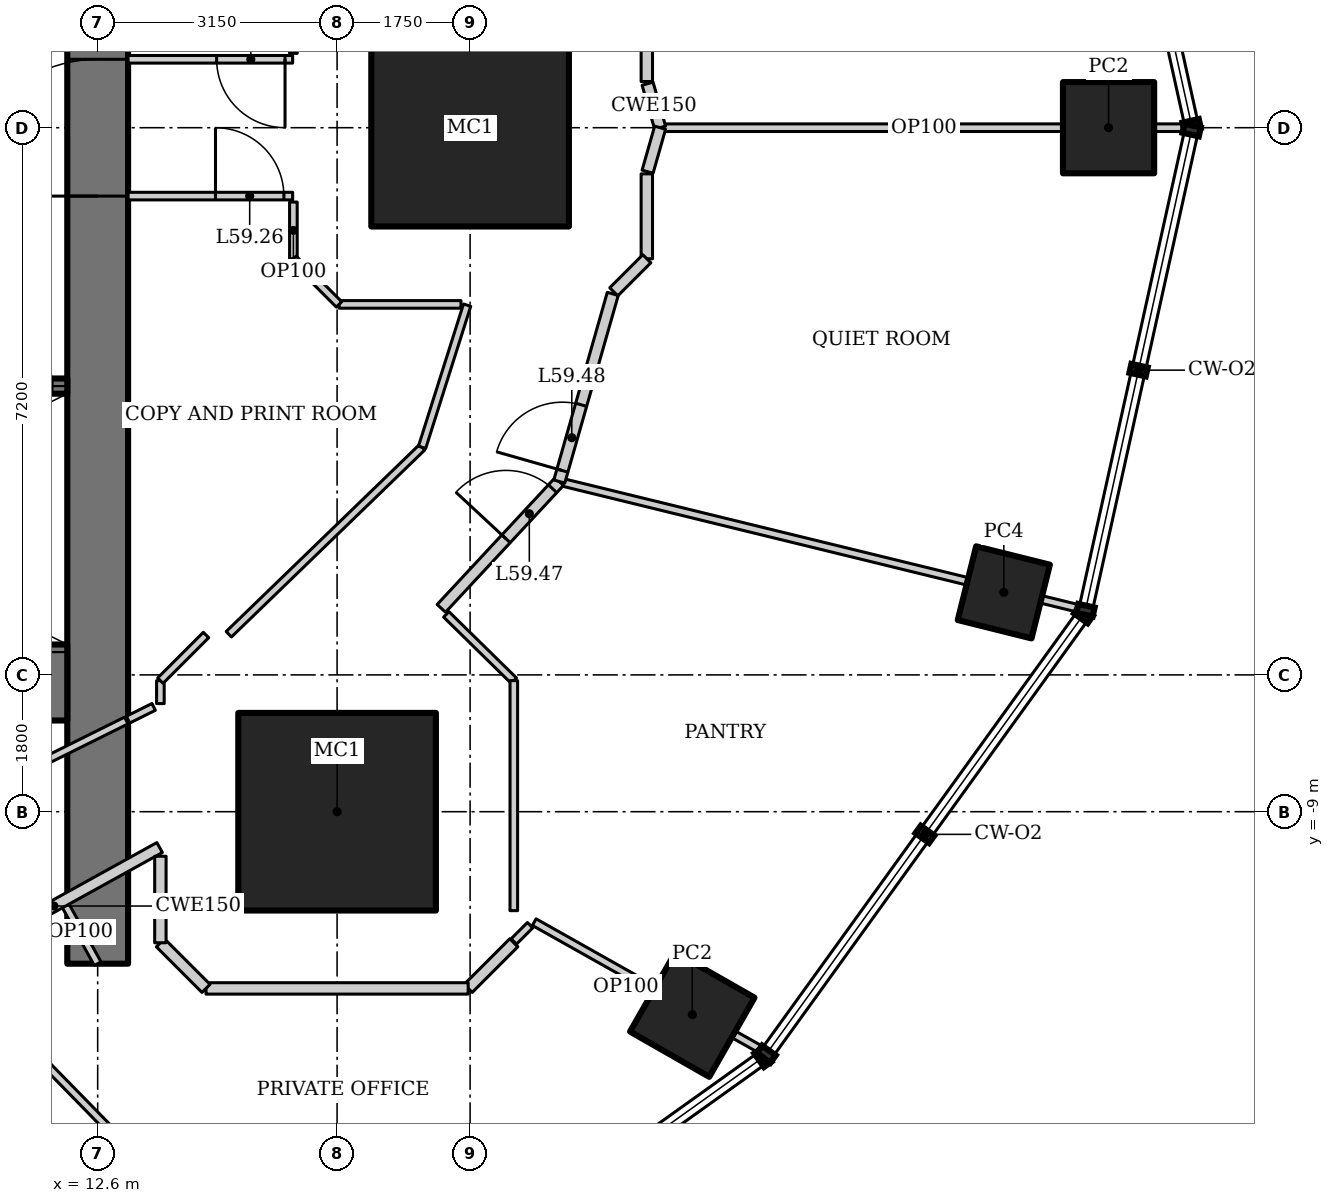
"""IFC4 building model, lengths in metres.
Left out: names, types, materials, properties, quantities, classifications, styles, units other than length and angle.
Written with IfcOpenShell. Run it as: python <this file> out.ifc"""

import sys

from ifc_helpers import new_model, si_unit, direction, frame, frame_2d, origin, origin_2d, place, context, subcontext, project, spatial, rectangle, hollow_rectangle, extrude, element, fill, save


model = new_model("IFC4")
c1 = context("Model", 3, precision=1e-05, world=origin(), true_north=direction((0.0, 1.0)))
c2 = subcontext(c1, "Body", "Model", "MODEL_VIEW")
j1 = project(units=[si_unit("LENGTHUNIT", "METRE"), si_unit("PLANEANGLEUNIT", "RADIAN")], contexts=[c1])
p1 = place(None, origin())
s1 = spatial("IfcSite", under=j1, at=p1, CompositionType="ELEMENT")
p2 = place(p1, origin())
s2 = spatial("IfcBuilding", under=s1, at=p2, CompositionType="ELEMENT")
p3 = place(p2, frame((0.0, 0.0, 253.6)))
s3 = spatial("IfcBuildingStorey", under=s2, at=p3, CompositionType="ELEMENT", Elevation=253.6)
for number, where, z_axis, x_axis in (
    (1, (17.5, 0.0, 0.0), (0.0, 0.0, 1.0), (1.0, 0.0, 0.0)),
    (2, (15.75, -9.0, 0.0), (0.0, 0.0, 1.0), (1.0, 0.0, 0.0)),
):
    element("IfcColumn", number, at=place(p3, frame(where, z_axis=z_axis, x_axis=x_axis)), inside=s3, PredefinedType="COLUMN", context=c2, shape_type="SweptSolid", body=[
        extrude(hollow_rectangle(XDim=2.6, YDim=2.6, WallThickness=0.13, at=origin_2d()), origin(), (0.0, 0.0, 1.0), 4.2),
    ])
for number, where, z_axis, x_axis in (
    (3, (25.9, 0.0, 0.0), (0.0, 0.0, 1.0), (1.0, 0.0, 0.0)),
    (4, (20.423, -11.67, 0.0), (0.0, 0.0, 1.0), (0.496, 0.868, 0.0)),
):
    element("IfcColumn", number, at=place(p3, frame(where, z_axis=z_axis, x_axis=x_axis)), inside=s3, PredefinedType="COLUMN", context=c2, shape_type="SweptSolid", body=[
        extrude(hollow_rectangle(XDim=1.2, YDim=1.2, WallThickness=0.1, at=origin_2d()), origin(), (0.0, 0.0, 1.0), 4.2),
    ])
p4 = place(p3, frame((24.522, -6.114, 0.0), z_axis=(0.0, 0.0, 1.0), x_axis=(0.2419218956, 0.970295726276, 0.0)))
e5 = element("IfcColumn", 5, at=p4, inside=s3, PredefinedType="COLUMN", context=c2, shape_type="SweptSolid", body=[
    extrude(hollow_rectangle(XDim=1.0, YDim=1.0, WallThickness=0.08, at=origin_2d()), origin(), (0.0, 0.0, 1.0), 4.2),
])
p5 = place(p3, frame((12.6, -11.0, 0.0), z_axis=(0.0, 0.0, 1.0), x_axis=(0.0, 1.0, 0.0)))
e6 = element("IfcWall", 6, at=p5, inside=s3, PredefinedType="SHEAR", context=c2, shape_type="SweptSolid", body=[
    extrude(rectangle(XDim=22.0, YDim=0.8, at=frame_2d((11.0, 0.0))), origin(), (0.0, 0.0, 1.0), 4.2),
])
p6 = place(p5, frame((10.1, 0.0, 0.0)))
e7 = element("IfcOpeningElement", 7, at=p6, cuts=e6, PredefinedType="OPENING", context=c2, shape_type="SweptSolid", body=[
    extrude(rectangle(XDim=1.8, YDim=2.1, at=frame_2d((0.9, 1.05))), frame((0.0, 0.41, 0.0), z_axis=(0.0, -1.0, 0.0), x_axis=(1.0, 0.0, 0.0)), (0.0, 0.0, 1.0), 0.82),
])
p7 = place(p3, frame((-12.2, -7.3, 0.0), z_axis=(0.0, 0.0, 1.0), x_axis=(1.0, 0.0, 0.0)))
e8 = element("IfcWall", 8, at=p7, inside=s3, PredefinedType="SHEAR", context=c2, shape_type="SweptSolid", body=[
    extrude(rectangle(XDim=24.4, YDim=1.0, at=frame_2d((12.2, 0.0))), origin(), (0.0, 0.0, 1.0), 4.2),
])
p8 = place(p3, frame((5.6, -3.4, 0.0), z_axis=(0.0, 0.0, 1.0), x_axis=(1.0, 0.0, 0.0)))
e9 = element("IfcWall", 9, at=p8, inside=s3, PredefinedType="SHEAR", context=c2, shape_type="SweptSolid", body=[
    extrude(rectangle(XDim=6.6, YDim=0.2, at=frame_2d((3.3, 0.0))), origin(), (0.0, 0.0, 1.0), 4.2),
])
p9 = place(p8, frame((5.2, 0.0, 0.0)))
e10 = element("IfcOpeningElement", 10, at=p9, cuts=e9, PredefinedType="OPENING", context=c2, shape_type="SweptSolid", body=[
    extrude(rectangle(XDim=1.2, YDim=2.1, at=frame_2d((0.6, 1.05))), frame((0.0, 0.11, 0.0), z_axis=(0.0, -1.0, 0.0), x_axis=(1.0, 0.0, 0.0)), (0.0, 0.0, 1.0), 0.22),
])
p10 = place(p3, frame((26.944, 0.0, 0.0), z_axis=(0.0, 0.0, 1.0), x_axis=(-1.0, 0.0, 0.0)))
e11 = element("IfcWall", 11, at=p10, inside=s3, PredefinedType="PARTITIONING", context=c2, shape_type="SweptSolid", body=[
    extrude(rectangle(XDim=6.944, YDim=0.1, at=frame_2d((3.472, 0.0))), origin(), (0.0, 0.0, 1.0), 3.349),
])
p11 = place(p3, frame((15.709, -16.199, 0.0), z_axis=(0.0, 0.0, 1.0), x_axis=(-0.699362525935, 0.714767135029, 0.0)))
e12 = element("IfcWall", 12, at=p11, inside=s3, PredefinedType="PARTITIONING", context=c2, shape_type="SweptSolid", body=[
    extrude(rectangle(XDim=7.259, YDim=0.1, at=frame_2d((3.629, 0.0))), origin(), (0.0, 0.0, 1.0), 3.41),
])
p12 = place(p3, frame((25.543, -6.335, 0.0), z_axis=(0.0, 0.0, 1.0), x_axis=(-0.971384494438, 0.237512450129, 0.0)))
e13 = element("IfcWall", 13, at=p12, inside=s3, PredefinedType="PARTITIONING", context=c2, shape_type="SweptSolid", body=[
    extrude(rectangle(XDim=7.072, YDim=0.1, at=frame_2d((3.536, 0.0))), origin(), (0.0, 0.0, 1.0), 3.108),
])
p13 = place(p3, frame((12.977, -7.8, 0.0), z_axis=(0.0, 0.0, 1.0), x_axis=(-0.895529831139, -0.445001484874, 0.0)))
e14 = element("IfcWall", 14, at=p13, inside=s3, PredefinedType="PARTITIONING", context=c2, shape_type="SweptSolid", body=[
    extrude(rectangle(XDim=4.108, YDim=0.1, at=frame_2d((2.054, 0.0))), origin(), (0.0, 0.0, 1.0), 4.05),
])
p14 = place(p13, frame((1.604, 0.0, 0.0)))
e15 = element("IfcOpeningElement", 15, at=p14, cuts=e14, PredefinedType="OPENING", context=c2, shape_type="SweptSolid", body=[
    extrude(rectangle(XDim=0.9, YDim=2.1, at=frame_2d((0.45, 1.05))), frame((0.0, 0.06, 0.0), z_axis=(0.0, -1.0, 0.0), x_axis=(1.0, 0.0, 0.0)), (0.0, 0.0, 1.0), 0.12),
])
p15 = place(p3, frame((13.337, -7.621, 0.0), z_axis=(0.0, 0.0, 1.0), x_axis=(-0.895721570004, -0.444615416995, 0.0)))
e16 = element("IfcWall", 16, at=p15, inside=s3, PredefinedType="PARTITIONING", context=c2, shape_type="SweptSolid", body=[
    extrude(rectangle(XDim=0.376, YDim=0.1, at=frame_2d((0.188, 0.0))), origin(), (0.0, 0.0, 1.0), 4.05),
])
p16 = place(p3, frame((12.6, -11.0, 0.0), z_axis=(0.0, 0.0, 1.0), x_axis=(-0.484103558985, 0.875010710893, 0.0)))
e17 = element("IfcWall", 17, at=p16, inside=s3, PredefinedType="PARTITIONING", context=c2, shape_type="SweptSolid", body=[
    extrude(rectangle(XDim=0.943, YDim=0.1, at=frame_2d((0.472, 0.0))), origin(), (0.0, 0.0, 1.0), 4.05),
])
p17 = place(p3, frame((21.358, -12.15, 0.0), z_axis=(0.0, 0.0, 1.0), x_axis=(-0.871494482514, 0.49040530885, 0.0)))
e18 = element("IfcWall", 18, at=p17, inside=s3, PredefinedType="PARTITIONING", context=c2, shape_type="SweptSolid", body=[
    extrude(rectangle(XDim=3.459, YDim=0.1, at=frame_2d((1.73, 0.0))), origin(), (0.0, 0.0, 1.0), 3.521),
])
p18 = place(p3, frame((10.633, -11.01, 0.0), z_axis=(0.0, 0.0, 1.0), x_axis=(0.875072100837, 0.483992580869, 0.0)))
e19 = element("IfcWall", 19, at=p18, inside=s3, PredefinedType="PARTITIONING", context=c2, shape_type="SweptSolid", body=[
    extrude(rectangle(XDim=3.179, YDim=0.15, at=frame_2d((1.59, 0.0))), origin(), (0.0, 0.0, 1.0), 4.05),
])
p19 = place(p18, frame((0.15, 0.0, 0.0)))
e20 = element("IfcOpeningElement", 20, at=p19, cuts=e19, PredefinedType="OPENING", context=c2, shape_type="SweptSolid", body=[
    extrude(rectangle(XDim=0.9, YDim=2.1, at=frame_2d((0.45, 1.05))), frame((0.0, 0.085, 0.0), z_axis=(0.0, -1.0, 0.0), x_axis=(1.0, 0.0, 0.0)), (0.0, 0.0, 1.0), 0.17),
])
p20 = place(p3, frame((17.121, -6.325, 0.0), z_axis=(0.0, 0.0, 1.0), x_axis=(0.680985069419, 0.732297299755, 0.0)))
e21 = element("IfcWall", 21, at=p20, inside=s3, PredefinedType="PARTITIONING", context=c2, shape_type="SweptSolid", body=[
    extrude(rectangle(XDim=2.279, YDim=0.15, at=frame_2d((1.14, 0.0))), origin(), (0.0, 0.0, 1.0), 4.05),
])
p21 = place(p20, frame((1.25, 0.0, 0.0)))
e22 = element("IfcOpeningElement", 22, at=p21, cuts=e21, PredefinedType="OPENING", context=c2, shape_type="SweptSolid", body=[
    extrude(rectangle(XDim=0.9, YDim=2.1, at=frame_2d((0.45, 1.05))), frame((0.0, 0.085, 0.0), z_axis=(0.0, -1.0, 0.0), x_axis=(1.0, 0.0, 0.0)), (0.0, 0.0, 1.0), 0.17),
])
p22 = place(p3, frame((16.868, -4.206, 0.0), z_axis=(0.0, 0.0, 1.0), x_axis=(-0.718810161381, -0.695206409562, 0.0)))
e23 = element("IfcWall", 23, at=p22, inside=s3, PredefinedType="PARTITIONING", context=c2, shape_type="SweptSolid", body=[
    extrude(rectangle(XDim=3.537, YDim=0.1, at=frame_2d((1.769, 0.0))), origin(), (0.0, 0.0, 1.0), 4.05),
])
p23 = place(p3, frame((13.425, -7.578, 0.0), z_axis=(0.0, 0.0, 1.0), x_axis=(0.0, 1.0, 0.0)))
e24 = element("IfcWall", 24, at=p23, inside=s3, PredefinedType="PARTITIONING", context=c2, shape_type="SweptSolid", body=[
    extrude(rectangle(XDim=0.302, YDim=0.1, at=frame_2d((0.151, 0.0))), origin(), (0.0, 0.0, 1.0), 4.05),
])
p24 = place(p3, frame((13.425, -7.275, 0.0), z_axis=(0.0, 0.0, 1.0), x_axis=(0.707106781187, 0.707106781187, 0.0)))
e25 = element("IfcWall", 25, at=p24, inside=s3, PredefinedType="PARTITIONING", context=c2, shape_type="SweptSolid", body=[
    extrude(rectangle(XDim=0.849, YDim=0.1, at=frame_2d((0.425, 0.0))), origin(), (0.0, 0.0, 1.0), 4.05),
])
p25 = place(p3, frame((18.075, -10.725, 0.0), z_axis=(0.0, 0.0, 1.0), x_axis=(-0.707106781187, -0.707106781187, 0.0)))
e26 = element("IfcWall", 26, at=p25, inside=s3, PredefinedType="PARTITIONING", context=c2, shape_type="SweptSolid", body=[
    extrude(rectangle(XDim=0.849, YDim=0.15, at=frame_2d((0.425, 0.0))), origin(), (0.0, 0.0, 1.0), 4.05),
])
p26 = place(p3, frame((17.475, -11.325, 0.0), z_axis=(0.0, 0.0, 1.0), x_axis=(-1.0, 0.0, 0.0)))
e27 = element("IfcWall", 27, at=p26, inside=s3, PredefinedType="PARTITIONING", context=c2, shape_type="SweptSolid", body=[
    extrude(rectangle(XDim=3.449, YDim=0.15, at=frame_2d((1.725, 0.0))), origin(), (0.0, 0.0, 1.0), 4.05),
])
p27 = place(p3, frame((14.025, -11.325, 0.0), z_axis=(0.0, 0.0, 1.0), x_axis=(-0.707106781187, 0.707106781187, 0.0)))
e28 = element("IfcWall", 28, at=p27, inside=s3, PredefinedType="PARTITIONING", context=c2, shape_type="SweptSolid", body=[
    extrude(rectangle(XDim=0.849, YDim=0.15, at=frame_2d((0.425, 0.0))), origin(), (0.0, 0.0, 1.0), 4.05),
])
p28 = place(p3, frame((13.425, -10.725, 0.0), z_axis=(0.0, 0.0, 1.0), x_axis=(0.0, 1.0, 0.0)))
e29 = element("IfcWall", 29, at=p28, inside=s3, PredefinedType="PARTITIONING", context=c2, shape_type="SweptSolid", body=[
    extrude(rectangle(XDim=1.138, YDim=0.15, at=frame_2d((0.569, 0.0))), origin(), (0.0, 0.0, 1.0), 4.05),
])
p29 = place(p3, frame((18.289, -10.493, 0.0), z_axis=(0.0, 0.0, 1.0), x_axis=(-0.707509576179, -0.706703756616, 0.0)))
e30 = element("IfcWall", 30, at=p29, inside=s3, PredefinedType="PARTITIONING", context=c2, shape_type="SweptSolid", body=[
    extrude(rectangle(XDim=0.303, YDim=0.1, at=frame_2d((0.151, 0.0))), origin(), (0.0, 0.0, 1.0), 4.05),
])
p30 = place(p3, frame((17.187, -6.404, 0.0), z_axis=(0.0, 0.0, 1.0), x_axis=(0.713842064016, -0.700306723973, 0.0)))
e31 = element("IfcWall", 31, at=p30, inside=s3, PredefinedType="PARTITIONING", context=c2, shape_type="SweptSolid", body=[
    extrude(rectangle(XDim=1.245, YDim=0.1, at=frame_2d((0.622, 0.0))), origin(), (0.0, 0.0, 1.0), 4.05),
])
p31 = place(p3, frame((18.075, -7.275, 0.0), z_axis=(0.0, 0.0, 1.0), x_axis=(0.0, -1.0, 0.0)))
e32 = element("IfcWall", 32, at=p31, inside=s3, PredefinedType="PARTITIONING", context=c2, shape_type="SweptSolid", body=[
    extrude(rectangle(XDim=3.027, YDim=0.1, at=frame_2d((1.513, 0.0))), origin(), (0.0, 0.0, 1.0), 3.6),
])
p32 = place(p3, frame((20.0, 0.0, 0.0), z_axis=(0.0, 0.0, 1.0), x_axis=(-0.27407847996, 0.961707329089, 0.0)))
e33 = element("IfcWall", 33, at=p32, inside=s3, PredefinedType="PARTITIONING", context=c2, shape_type="SweptSolid", body=[
    extrude(rectangle(XDim=0.602, YDim=0.15, at=frame_2d((0.301, 0.0))), origin(), (0.0, 0.0, 1.0), 4.05),
])
p33 = place(p3, frame((18.673, -4.656, 0.0), z_axis=(0.0, 0.0, 1.0), x_axis=(0.274067949327, 0.961710330168, 0.0)))
e34 = element("IfcWall", 34, at=p33, inside=s3, PredefinedType="PARTITIONING", context=c2, shape_type="SweptSolid", body=[
    extrude(rectangle(XDim=2.567, YDim=0.15, at=frame_2d((1.284, 0.0))), origin(), (0.0, 0.0, 1.0), 4.05),
])
p34 = place(p33, frame((0.15, 0.0, 0.0)))
e35 = element("IfcOpeningElement", 35, at=p34, cuts=e34, PredefinedType="OPENING", context=c2, shape_type="SweptSolid", body=[
    extrude(rectangle(XDim=0.9, YDim=2.1, at=frame_2d((0.45, 1.05))), frame((0.0, 0.085, 0.0), z_axis=(0.0, -1.0, 0.0), x_axis=(1.0, 0.0, 0.0)), (0.0, 0.0, 1.0), 0.17),
])
p35 = place(p3, frame((19.835, -0.579, 0.0), z_axis=(0.0, 0.0, 1.0), x_axis=(0.27407847996, 0.961707329089, 0.0)))
e36 = element("IfcWall", 36, at=p35, inside=s3, PredefinedType="PARTITIONING", context=c2, shape_type="SweptSolid", body=[
    extrude(rectangle(XDim=0.602, YDim=0.15, at=frame_2d((0.301, 0.0))), origin(), (0.0, 0.0, 1.0), 4.05),
])
p36 = place(p3, frame((13.0, -0.9, 0.0), z_axis=(0.0, 0.0, 1.0), x_axis=(1.0, 0.0, 0.0)))
e37 = element("IfcWall", 37, at=p36, inside=s3, PredefinedType="PARTITIONING", context=c2, shape_type="SweptSolid", body=[
    extrude(rectangle(XDim=2.165, YDim=0.1, at=frame_2d((1.083, 0.0))), origin(), (0.0, 0.0, 1.0), 4.05),
])
p37 = place(p36, frame((1.15, 0.0, 0.0)))
e38 = element("IfcOpeningElement", 38, at=p37, cuts=e37, PredefinedType="OPENING", context=c2, shape_type="SweptSolid", body=[
    extrude(rectangle(XDim=0.9, YDim=2.1, at=frame_2d((0.45, 1.05))), frame((0.0, 0.06, 0.0), z_axis=(0.0, -1.0, 0.0), x_axis=(1.0, 0.0, 0.0)), (0.0, 0.0, 1.0), 0.12),
])
p38 = place(p3, frame((17.46, -2.335, 0.0), z_axis=(0.0, 0.0, 1.0), x_axis=(-0.301821975729, -0.953364303384, 0.0)))
e39 = element("IfcWall", 39, at=p38, inside=s3, PredefinedType="PARTITIONING", context=c2, shape_type="SweptSolid", body=[
    extrude(rectangle(XDim=1.962, YDim=0.1, at=frame_2d((0.981, 0.0))), origin(), (0.0, 0.0, 1.0), 4.05),
])
p39 = place(p3, frame((15.165, 0.9, 0.0), z_axis=(0.0, 0.0, 1.0), x_axis=(-1.0, 0.0, 0.0)))
e40 = element("IfcWall", 40, at=p39, inside=s3, PredefinedType="PARTITIONING", context=c2, shape_type="SweptSolid", body=[
    extrude(rectangle(XDim=2.165, YDim=0.1, at=frame_2d((1.083, 0.0))), origin(), (0.0, 0.0, 1.0), 4.05),
])
p40 = place(p39, frame((0.1, 0.0, 0.0)))
e41 = element("IfcOpeningElement", 41, at=p40, cuts=e40, PredefinedType="OPENING", context=c2, shape_type="SweptSolid", body=[
    extrude(rectangle(XDim=0.9, YDim=2.1, at=frame_2d((0.45, 1.05))), frame((0.0, 0.06, 0.0), z_axis=(0.0, -1.0, 0.0), x_axis=(1.0, 0.0, 0.0)), (0.0, 0.0, 1.0), 0.12),
])
p41 = place(p3, frame((15.175, -1.725, 0.0), z_axis=(0.0, 0.0, 1.0), x_axis=(0.0, 1.0, 0.0)))
e42 = element("IfcWall", 42, at=p41, inside=s3, PredefinedType="PARTITIONING", context=c2, shape_type="SweptSolid", body=[
    extrude(rectangle(XDim=0.746, YDim=0.1, at=frame_2d((0.373, 0.0))), origin(), (0.0, 0.0, 1.0), 4.05),
])
p42 = place(p3, frame((17.38, -2.325, 0.0), z_axis=(0.0, 0.0, 1.0), x_axis=(-1.0, 0.0, 0.0)))
e43 = element("IfcWall", 43, at=p42, inside=s3, PredefinedType="PARTITIONING", context=c2, shape_type="SweptSolid", body=[
    extrude(rectangle(XDim=1.604, YDim=0.1, at=frame_2d((0.802, 0.0))), origin(), (0.0, 0.0, 1.0), 4.05),
])
p43 = place(p3, frame((15.775, -2.325, 0.0), z_axis=(0.0, 0.0, 1.0), x_axis=(-0.707106781187, 0.707106781187, 0.0)))
e44 = element("IfcWall", 44, at=p43, inside=s3, PredefinedType="PARTITIONING", context=c2, shape_type="SweptSolid", body=[
    extrude(rectangle(XDim=0.849, YDim=0.1, at=frame_2d((0.425, 0.0))), origin(), (0.0, 0.0, 1.0), 4.05),
])
p44 = place(p3, frame((15.175, 0.978, 0.0), z_axis=(0.0, 0.0, 1.0), x_axis=(0.0, 1.0, 0.0)))
e45 = element("IfcWall", 45, at=p44, inside=s3, PredefinedType="PARTITIONING", context=c2, shape_type="SweptSolid", body=[
    extrude(rectangle(XDim=0.746, YDim=0.1, at=frame_2d((0.373, 0.0))), origin(), (0.0, 0.0, 1.0), 4.05),
])
for number, where, z_axis, x_axis in (
    (46, (19.825, 1.725, 0.0), (0.0, 0.0, 1.0), (0.0, -1.0, 0.0)),
    (47, (19.825, -0.607, 0.0), (0.0, 0.0, 1.0), (0.0, -1.0, 0.0)),
):
    element("IfcWall", number, at=place(p3, frame(where, z_axis=z_axis, x_axis=x_axis)), inside=s3, PredefinedType="PARTITIONING", context=c2, shape_type="SweptSolid", body=[
        extrude(rectangle(XDim=1.117, YDim=0.15, at=frame_2d((0.559, 0.0))), origin(), (0.0, 0.0, 1.0), 4.05),
    ])
p45 = place(p3, frame((19.825, -1.725, 0.0), z_axis=(0.0, 0.0, 1.0), x_axis=(-0.707106781187, -0.707106781187, 0.0)))
e48 = element("IfcWall", 48, at=p45, inside=s3, PredefinedType="PARTITIONING", context=c2, shape_type="SweptSolid", body=[
    extrude(rectangle(XDim=0.615, YDim=0.15, at=frame_2d((0.308, 0.0))), origin(), (0.0, 0.0, 1.0), 4.05),
])
p46 = place(p9, origin())
e49 = element("IfcDoor", 49, at=p46, inside=s3, OperationType="SINGLE_SWING_RIGHT", PredefinedType="DOOR", context=c2, shape_type="SweptSolid", body=[
    extrude(rectangle(XDim=1.2, YDim=2.1, at=frame_2d((0.6, 1.05))), frame((0.0, 0.025, 0.0), z_axis=(0.0, -1.0, 0.0), x_axis=(1.0, 0.0, 0.0)), (0.0, 0.0, 1.0), 0.05),
])
fill(e10, e49)
p47 = place(p6, origin())
e50 = element("IfcDoor", 50, at=p47, inside=s3, OperationType="DOUBLE_DOOR_DOUBLE_SWING", PredefinedType="DOOR", context=c2, shape_type="SweptSolid", body=[
    extrude(rectangle(XDim=1.8, YDim=2.1, at=frame_2d((0.9, 1.05))), frame((0.0, 0.025, 0.0), z_axis=(0.0, -1.0, 0.0), x_axis=(1.0, 0.0, 0.0)), (0.0, 0.0, 1.0), 0.05),
])
fill(e7, e50)
p48 = place(p37, origin())
e51 = element("IfcDoor", 51, at=p48, inside=s3, OperationType="SINGLE_SWING_LEFT", PredefinedType="DOOR", context=c2, shape_type="SweptSolid", body=[
    extrude(rectangle(XDim=0.9, YDim=2.1, at=frame_2d((0.45, 1.05))), frame((0.0, 0.025, 0.0), z_axis=(0.0, -1.0, 0.0), x_axis=(1.0, 0.0, 0.0)), (0.0, 0.0, 1.0), 0.05),
])
fill(e38, e51)
p49 = place(p40, origin())
e52 = element("IfcDoor", 52, at=p49, inside=s3, OperationType="SINGLE_SWING_LEFT", PredefinedType="DOOR", context=c2, shape_type="SweptSolid", body=[
    extrude(rectangle(XDim=0.9, YDim=2.1, at=frame_2d((0.45, 1.05))), frame((0.0, 0.025, 0.0), z_axis=(0.0, -1.0, 0.0), x_axis=(1.0, 0.0, 0.0)), (0.0, 0.0, 1.0), 0.05),
])
fill(e41, e52)
p50 = place(p21, origin())
e53 = element("IfcDoor", 53, at=p50, inside=s3, OperationType="SINGLE_SWING_LEFT", PredefinedType="DOOR", context=c2, shape_type="SweptSolid", body=[
    extrude(rectangle(XDim=0.9, YDim=2.1, at=frame_2d((0.45, 1.05))), frame((0.0, 0.025, 0.0), z_axis=(0.0, -1.0, 0.0), x_axis=(1.0, 0.0, 0.0)), (0.0, 0.0, 1.0), 0.05),
])
fill(e22, e53)
p51 = place(p34, origin())
e54 = element("IfcDoor", 54, at=p51, inside=s3, OperationType="SINGLE_SWING_LEFT", PredefinedType="DOOR", context=c2, shape_type="SweptSolid", body=[
    extrude(rectangle(XDim=0.9, YDim=2.1, at=frame_2d((0.45, 1.05))), frame((0.0, 0.025, 0.0), z_axis=(0.0, -1.0, 0.0), x_axis=(1.0, 0.0, 0.0)), (0.0, 0.0, 1.0), 0.05),
])
fill(e35, e54)
save(model, sys.argv[1])
